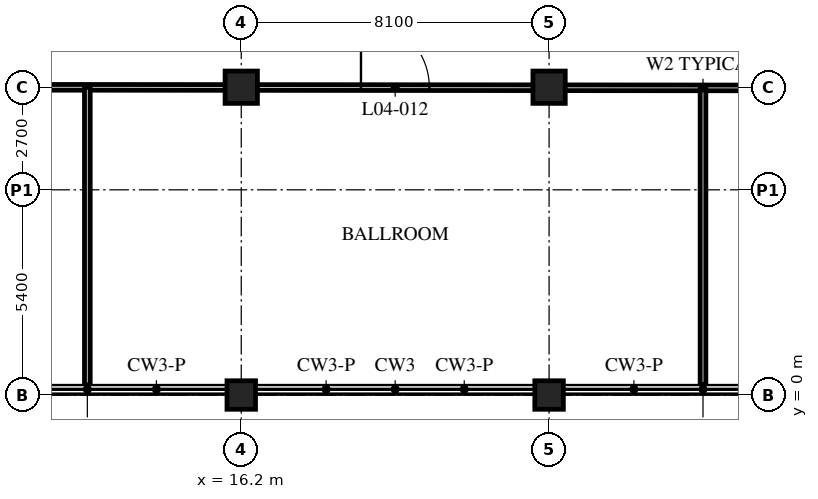
"""IFC4 building model, lengths in metres.
Left out: names, types, materials, properties, quantities, classifications, styles, units other than length and angle.
Written with IfcOpenShell. Run it as: python <this file> out.ifc"""

import sys

from ifc_helpers import new_model, si_unit, direction, frame, frame_2d, origin, origin_2d, place, context, subcontext, project, spatial, rectangle, hollow_rectangle, extrude, element, fill, save


model = new_model("IFC4")
c1 = context("Model", 3, precision=1e-05, world=origin(), true_north=direction((0.0, 1.0)))
c2 = subcontext(c1, "Body", "Model", "MODEL_VIEW")
j1 = project(units=[si_unit("LENGTHUNIT", "METRE"), si_unit("PLANEANGLEUNIT", "RADIAN")], contexts=[c1])
p1 = place(None, origin())
s1 = spatial("IfcSite", under=j1, at=p1, CompositionType="ELEMENT")
p2 = place(p1, origin())
s2 = spatial("IfcBuilding", under=s1, at=p2, CompositionType="ELEMENT")
p3 = place(p2, frame((0.0, 0.0, 22.2)))
s3 = spatial("IfcBuildingStorey", under=s2, at=p3, CompositionType="ELEMENT", Elevation=22.2)
p4 = place(p3, frame((16.2, 0.0, 0.0), z_axis=(0.0, 0.0, 1.0), x_axis=(1.0, 0.0, 0.0)))
e1 = element("IfcColumn", 1, at=p4, inside=s3, PredefinedType="COLUMN", context=c2, shape_type="SweptSolid", body=[
    extrude(hollow_rectangle(XDim=0.75, YDim=0.75, WallThickness=0.07, at=origin_2d()), origin(), (0.0, 0.0, 1.0), 5.4),
])
p5 = place(p3, frame((16.2, 8.1, 0.0), z_axis=(0.0, 0.0, 1.0), x_axis=(1.0, 0.0, 0.0)))
e2 = element("IfcColumn", 2, at=p5, inside=s3, PredefinedType="COLUMN", context=c2, shape_type="SweptSolid", body=[
    extrude(hollow_rectangle(XDim=0.85, YDim=0.85, WallThickness=0.085, at=origin_2d()), origin(), (0.0, 0.0, 1.0), 5.4),
])
p6 = place(p3, frame((24.3, 0.0, 0.0), z_axis=(0.0, 0.0, 1.0), x_axis=(1.0, 0.0, 0.0)))
e3 = element("IfcColumn", 3, at=p6, inside=s3, PredefinedType="COLUMN", context=c2, shape_type="SweptSolid", body=[
    extrude(hollow_rectangle(XDim=0.75, YDim=0.75, WallThickness=0.07, at=origin_2d()), origin(), (0.0, 0.0, 1.0), 5.4),
])
p7 = place(p3, frame((24.3, 8.1, 0.0), z_axis=(0.0, 0.0, 1.0), x_axis=(1.0, 0.0, 0.0)))
e4 = element("IfcColumn", 4, at=p7, inside=s3, PredefinedType="COLUMN", context=c2, shape_type="SweptSolid", body=[
    extrude(hollow_rectangle(XDim=0.85, YDim=0.85, WallThickness=0.085, at=origin_2d()), origin(), (0.0, 0.0, 1.0), 5.4),
])
p8 = place(p3, frame((8.1, 8.1, 0.0), z_axis=(0.0, 0.0, 1.0), x_axis=(0.99999962324, -0.000868055229, 0.0)))
e5 = element("IfcWall", 5, at=p8, inside=s3, PredefinedType="PARTITIONING", context=c2, shape_type="SweptSolid", body=[
    extrude(rectangle(XDim=40.5, YDim=0.15, at=frame_2d((20.25, 0.0))), origin(), (0.0, 0.0, 1.0), 4.428),
])
p9 = place(p8, frame((11.25, 0.0, 0.0)))
e6 = element("IfcOpeningElement", 6, at=p9, cuts=e5, PredefinedType="OPENING", context=c2, shape_type="SweptSolid", body=[
    extrude(rectangle(XDim=1.8, YDim=2.4, at=frame_2d((0.9, 1.2))), frame((0.0, 0.085, 0.0), z_axis=(0.0, -1.0, 0.0), x_axis=(1.0, 0.0, 0.0)), (0.0, 0.0, 1.0), 0.17),
])
p10 = place(p8, frame((25.15, 0.0, 0.0)))
e7 = element("IfcOpeningElement", 7, at=p10, cuts=e5, PredefinedType="OPENING", context=c2, shape_type="SweptSolid", body=[
    extrude(rectangle(XDim=1.8, YDim=2.4, at=frame_2d((0.9, 1.2))), frame((0.0, 0.085, 0.0), z_axis=(0.0, -1.0, 0.0), x_axis=(1.0, 0.0, 0.0)), (0.0, 0.0, 1.0), 0.17),
])
p11 = place(p8, frame((33.25, 0.0, 0.0)))
e8 = element("IfcOpeningElement", 8, at=p11, cuts=e5, PredefinedType="OPENING", context=c2, shape_type="SweptSolid", body=[
    extrude(rectangle(XDim=1.8, YDim=2.4, at=frame_2d((0.9, 1.2))), frame((0.0, 0.085, 0.0), z_axis=(0.0, -1.0, 0.0), x_axis=(1.0, 0.0, 0.0)), (0.0, 0.0, 1.0), 0.17),
])
p12 = place(p8, frame((1.525, 0.0, 0.0)))
e9 = element("IfcOpeningElement", 9, at=p12, cuts=e5, PredefinedType="OPENING", context=c2, shape_type="SweptSolid", body=[
    extrude(rectangle(XDim=1.0, YDim=2.1, at=frame_2d((0.5, 1.05))), frame((0.0, 0.085, 0.0), z_axis=(0.0, -1.0, 0.0), x_axis=(1.0, 0.0, 0.0)), (0.0, 0.0, 1.0), 0.17),
])
p13 = place(p8, frame((37.975, 0.0, 0.0)))
e10 = element("IfcOpeningElement", 10, at=p13, cuts=e5, PredefinedType="OPENING", context=c2, shape_type="SweptSolid", body=[
    extrude(rectangle(XDim=1.0, YDim=2.1, at=frame_2d((0.5, 1.05))), frame((0.0, 0.085, 0.0), z_axis=(0.0, -1.0, 0.0), x_axis=(1.0, 0.0, 0.0)), (0.0, 0.0, 1.0), 0.17),
])
for number, where, z_axis, x_axis in (
    (11, (28.35, 8.1, 0.0), (0.0, 0.0, 1.0), (0.0, -1.0, 0.0)),
    (12, (12.15, 8.1, 0.0), (0.0, 0.0, 1.0), (0.0, -1.0, 0.0)),
):
    element("IfcWall", number, at=place(p3, frame(where, z_axis=z_axis, x_axis=x_axis)), inside=s3, PredefinedType="PARTITIONING", context=c2, shape_type="SweptSolid", body=[
        extrude(rectangle(XDim=7.835, YDim=0.15, at=frame_2d((3.917, 0.0))), origin(), (0.0, 0.0, 1.0), 5.19),
    ])
p14 = place(p9, origin())
e13 = element("IfcDoor", 13, at=p14, inside=s3, OperationType="DOUBLE_DOOR_SINGLE_SWING", PredefinedType="DOOR", context=c2, shape_type="SweptSolid", body=[
    extrude(rectangle(XDim=1.8, YDim=2.4, at=frame_2d((0.9, 1.2))), frame((0.0, 0.025, 0.0), z_axis=(0.0, -1.0, 0.0), x_axis=(1.0, 0.0, 0.0)), (0.0, 0.0, 1.0), 0.05),
])
fill(e6, e13)
save(model, sys.argv[1])
